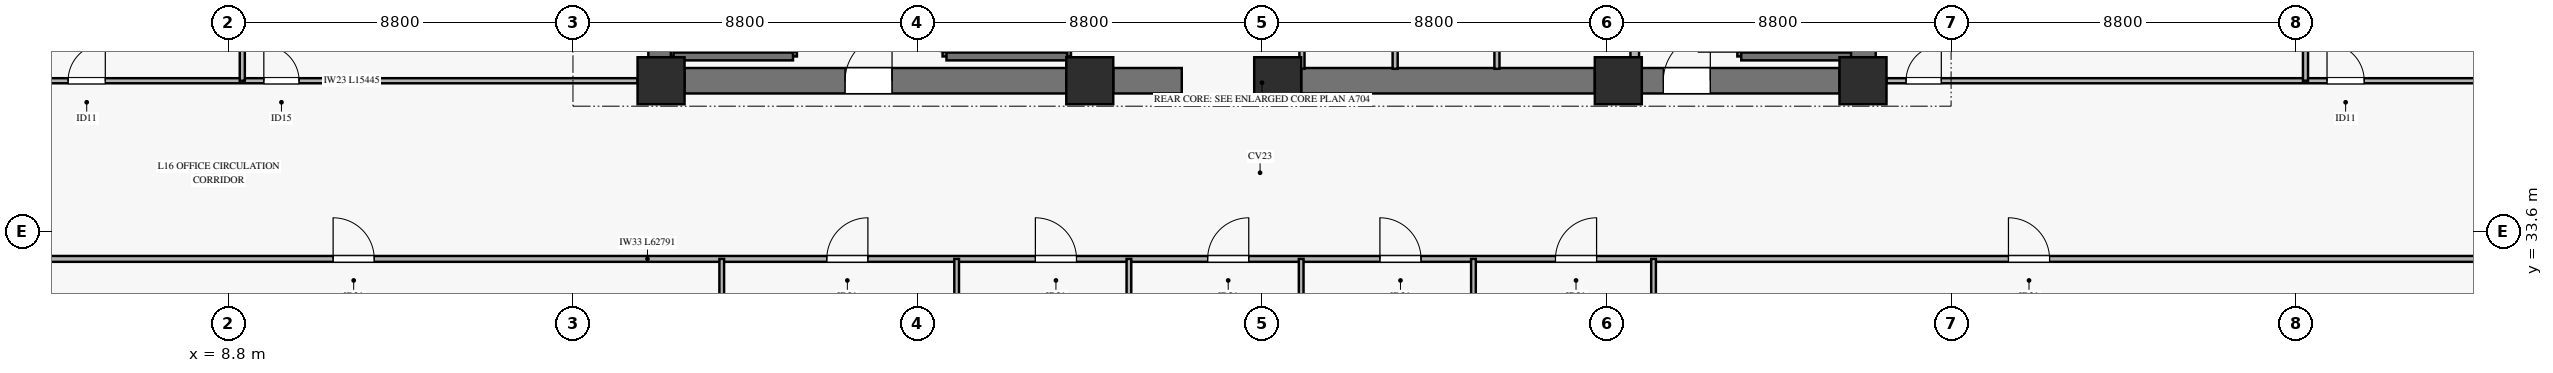
"""IFC4 building model, lengths in metres.
Left out: names, types, materials, properties, quantities, classifications, styles, units other than length and angle.
Written with IfcOpenShell. Run it as: python <this file> out.ifc"""

import sys

from ifc_helpers import new_model, si_unit, direction, frame, frame_2d, origin, origin_2d, place, context, subcontext, project, spatial, rectangle, extrude, source, transform, mapped, element, fill, save


model = new_model("IFC4")
c1 = context("Model", 3, precision=1e-05, world=origin(), true_north=direction((0.0, 1.0)))
c2 = subcontext(c1, "Body", "Model", "MODEL_VIEW")
j1 = project(units=[si_unit("LENGTHUNIT", "METRE"), si_unit("PLANEANGLEUNIT", "RADIAN")], contexts=[c1])
p1 = place(None, origin())
s1 = spatial("IfcSite", under=j1, at=p1, CompositionType="ELEMENT")
p2 = place(p1, origin())
s2 = spatial("IfcBuilding", under=s1, at=p2, CompositionType="ELEMENT")
p3 = place(p2, frame((0.0, 0.0, 65.0)))
s3 = spatial("IfcBuildingStorey", under=s2, at=p3, CompositionType="ELEMENT", Elevation=65.0)
m1 = source(origin(), c2, "Body", "SweptSolid", [
    extrude(rectangle(XDim=1.2, YDim=1.2, at=origin_2d()), origin(), (0.0, 0.0, 1.0), 3.68),
])
for number, where, z_axis, x_axis in (
    (1, (19.85, 37.45, 0.0), (0.0, 0.0, 1.0), (1.0, 0.0, 0.0)),
    (2, (30.8, 37.45, 0.0), (0.0, 0.0, 1.0), (1.0, 0.0, 0.0)),
    (3, (35.6, 37.45, 0.0), (0.0, 0.0, 1.0), (1.0, 0.0, 0.0)),
    (4, (44.3, 37.45, 0.0), (0.0, 0.0, 1.0), (1.0, 0.0, 0.0)),
    (5, (50.55, 37.45, 0.0), (0.0, 0.0, 1.0), (1.0, 0.0, 0.0)),
):
    element("IfcColumn", number, at=place(p3, frame(where, z_axis=z_axis, x_axis=x_axis)), inside=s3, PredefinedType="PILASTER", context=c2, shape_type="MappedRepresentation", body=[
        mapped(m1, transform((0.0, 0.0, 0.0), x_axis=(1.0, 0.0, 0.0), y_axis=(0.0, 1.0, 0.0), z_axis=(0.0, 0.0, 1.0), scale=1.0)),
    ])
p4 = place(p3, frame((20.45, 37.45, 0.0), z_axis=(0.0, 0.0, 1.0), x_axis=(1.0, 0.0, 0.0)))
e6 = element("IfcWall", 6, at=p4, inside=s3, PredefinedType="SHEAR", context=c2, shape_type="SweptSolid", body=[
    extrude(rectangle(XDim=9.75, YDim=0.65, at=frame_2d((4.875, 0.0))), origin(), (0.0, 0.0, 1.0), 3.68),
])
p5 = place(p4, frame((4.1, 0.0, 0.0)))
e7 = element("IfcOpeningElement", 7, at=p5, cuts=e6, PredefinedType="OPENING", context=c2, shape_type="SweptSolid", body=[
    extrude(rectangle(XDim=1.2, YDim=2.15, at=frame_2d((0.6, 1.075))), frame((0.0, 0.335, 0.0), z_axis=(0.0, -1.0, 0.0), x_axis=(1.0, 0.0, 0.0)), (0.0, 0.0, 1.0), 0.67),
])
p6 = place(p3, frame((31.4, 37.45, 0.0), z_axis=(0.0, 0.0, 1.0), x_axis=(1.0, 0.0, 0.0)))
e8 = element("IfcWall", 8, at=p6, inside=s3, PredefinedType="SHEAR", context=c2, shape_type="SweptSolid", body=[
    extrude(rectangle(XDim=1.75, YDim=0.65, at=frame_2d((0.875, 0.0))), origin(), (0.0, 0.0, 1.0), 3.68),
])
p7 = place(p3, frame((36.2, 37.45, 0.0), z_axis=(0.0, 0.0, 1.0), x_axis=(1.0, 0.0, 0.0)))
e9 = element("IfcWall", 9, at=p7, inside=s3, PredefinedType="SHEAR", context=c2, shape_type="SweptSolid", body=[
    extrude(rectangle(XDim=7.5, YDim=0.65, at=frame_2d((3.75, 0.0))), origin(), (0.0, 0.0, 1.0), 3.68),
])
p8 = place(p3, frame((44.9, 37.45, 0.0), z_axis=(0.0, 0.0, 1.0), x_axis=(1.0, 0.0, 0.0)))
e10 = element("IfcWall", 10, at=p8, inside=s3, PredefinedType="SHEAR", context=c2, shape_type="SweptSolid", body=[
    extrude(rectangle(XDim=5.05, YDim=0.65, at=frame_2d((2.525, 0.0))), origin(), (0.0, 0.0, 1.0), 3.68),
])
p9 = place(p8, frame((0.55, 0.0, 0.0)))
e11 = element("IfcOpeningElement", 11, at=p9, cuts=e10, PredefinedType="OPENING", context=c2, shape_type="SweptSolid", body=[
    extrude(rectangle(XDim=1.2, YDim=2.15, at=frame_2d((0.6, 1.075))), frame((0.0, 0.335, 0.0), z_axis=(0.0, -1.0, 0.0), x_axis=(1.0, 0.0, 0.0)), (0.0, 0.0, 1.0), 0.67),
])
for number, where, z_axis, x_axis in (
    (12, (19.85, 38.05, 0.0), (0.0, 0.0, 1.0), (0.0, 1.0, 0.0)),
    (13, (50.55, 38.05, 0.0), (0.0, 0.0, 1.0), (0.0, 1.0, 0.0)),
):
    element("IfcWall", number, at=place(p3, frame(where, z_axis=z_axis, x_axis=x_axis)), inside=s3, PredefinedType="SHEAR", context=c2, shape_type="SweptSolid", body=[
        extrude(rectangle(XDim=7.9, YDim=0.65, at=frame_2d((3.95, 0.0))), origin(), (0.0, 0.0, 1.0), 3.68),
    ])
p10 = place(p3, frame((20.17, 38.07, 0.0), z_axis=(0.0, 0.0, 1.0), x_axis=(0.0, 1.0, 0.0)))
e14 = element("IfcWall", 14, at=p10, inside=s3, PredefinedType="SOLIDWALL", context=c2, shape_type="SweptSolid", body=[
    extrude(rectangle(XDim=7.25, YDim=0.14, at=frame_2d((3.625, 0.0))), origin(), (0.0, 0.0, 1.0), 3.9),
])
p11 = place(p3, frame((23.22, 38.07, 0.0), z_axis=(0.0, 0.0, 1.0), x_axis=(0.0, 1.0, 0.0)))
e15 = element("IfcWall", 15, at=p11, inside=s3, PredefinedType="SOLIDWALL", context=c2, shape_type="SweptSolid", body=[
    extrude(rectangle(XDim=7.25, YDim=0.2, at=frame_2d((3.625, 0.0))), origin(), (0.0, 0.0, 1.0), 3.9),
])
p12 = place(p11, frame((0.11, 0.0, 0.0)))
e16 = element("IfcOpeningElement", 16, at=p12, cuts=e15, PredefinedType="OPENING", context=c2, shape_type="SweptSolid", body=[
    extrude(rectangle(XDim=1.1, YDim=2.15, at=frame_2d((0.55, 1.075))), frame((0.0, 0.11, 0.0), z_axis=(0.0, -1.0, 0.0), x_axis=(1.0, 0.0, 0.0)), (0.0, 0.0, 1.0), 0.22),
])
p13 = place(p3, frame((20.17, 38.07, 0.0), z_axis=(0.0, 0.0, 1.0), x_axis=(1.0, 0.0, 0.0)))
e17 = element("IfcWall", 17, at=p13, inside=s3, PredefinedType="SOLIDWALL", context=c2, shape_type="SweptSolid", body=[
    extrude(rectangle(XDim=3.05, YDim=0.2, at=frame_2d((1.525, 0.0))), origin(), (0.0, 0.0, 1.0), 3.9),
])
p14 = place(p3, frame((27.14, 38.07, 0.0), z_axis=(0.0, 0.0, 1.0), x_axis=(0.0, 1.0, 0.0)))
e18 = element("IfcWall", 18, at=p14, inside=s3, PredefinedType="SOLIDWALL", context=c2, shape_type="SweptSolid", body=[
    extrude(rectangle(XDim=7.25, YDim=0.2, at=frame_2d((3.625, 0.0))), origin(), (0.0, 0.0, 1.0), 3.9),
])
p15 = place(p14, frame((0.11, 0.0, 0.0)))
e19 = element("IfcOpeningElement", 19, at=p15, cuts=e18, PredefinedType="OPENING", context=c2, shape_type="SweptSolid", body=[
    extrude(rectangle(XDim=1.1, YDim=2.15, at=frame_2d((0.55, 1.075))), frame((0.0, 0.11, 0.0), z_axis=(0.0, -1.0, 0.0), x_axis=(1.0, 0.0, 0.0)), (0.0, 0.0, 1.0), 0.22),
])
p16 = place(p3, frame((30.22, 38.07, 0.0), z_axis=(0.0, 0.0, 1.0), x_axis=(0.0, 1.0, 0.0)))
e20 = element("IfcWall", 20, at=p16, inside=s3, PredefinedType="SOLIDWALL", context=c2, shape_type="SweptSolid", body=[
    extrude(rectangle(XDim=7.25, YDim=0.2, at=frame_2d((3.625, 0.0))), origin(), (0.0, 0.0, 1.0), 3.9),
])
p17 = place(p3, frame((27.14, 38.07, 0.0), z_axis=(0.0, 0.0, 1.0), x_axis=(1.0, 0.0, 0.0)))
e21 = element("IfcWall", 21, at=p17, inside=s3, PredefinedType="SOLIDWALL", context=c2, shape_type="SweptSolid", body=[
    extrude(rectangle(XDim=3.08, YDim=0.2, at=frame_2d((1.54, 0.0))), origin(), (0.0, 0.0, 1.0), 3.9),
])
p18 = place(p3, frame((47.44, 38.07, 0.0), z_axis=(0.0, 0.0, 1.0), x_axis=(0.0, 1.0, 0.0)))
e22 = element("IfcWall", 22, at=p18, inside=s3, PredefinedType="SOLIDWALL", context=c2, shape_type="SweptSolid", body=[
    extrude(rectangle(XDim=7.25, YDim=0.2, at=frame_2d((3.625, 0.0))), origin(), (0.0, 0.0, 1.0), 3.9),
])
p19 = place(p18, frame((0.11, 0.0, 0.0)))
e23 = element("IfcOpeningElement", 23, at=p19, cuts=e22, PredefinedType="OPENING", context=c2, shape_type="SweptSolid", body=[
    extrude(rectangle(XDim=1.1, YDim=2.15, at=frame_2d((0.55, 1.075))), frame((0.0, 0.11, 0.0), z_axis=(0.0, -1.0, 0.0), x_axis=(1.0, 0.0, 0.0)), (0.0, 0.0, 1.0), 0.22),
])
p20 = place(p3, frame((47.44, 38.07, 0.0), z_axis=(0.0, 0.0, 1.0), x_axis=(1.0, 0.0, 0.0)))
e24 = element("IfcWall", 24, at=p20, inside=s3, PredefinedType="SOLIDWALL", context=c2, shape_type="SweptSolid", body=[
    extrude(rectangle(XDim=2.805, YDim=0.2, at=frame_2d((1.403, 0.0))), origin(), (0.0, 0.0, 1.0), 3.9),
])
p21 = place(p3, frame((44.72, 37.755, 0.0), z_axis=(0.0, 0.0, 1.0), x_axis=(0.0, 1.0, 0.0)))
e25 = element("IfcWall", 25, at=p21, inside=s3, PredefinedType="SOLIDWALL", context=c2, shape_type="SweptSolid", body=[
    extrude(rectangle(XDim=7.465, YDim=0.22, at=frame_2d((3.732, 0.0))), origin(), (0.0, 0.0, 1.0), 3.68),
])
p22 = place(p3, frame((36.22, 37.755, 0.0), z_axis=(0.0, 0.0, 1.0), x_axis=(0.0, 1.0, 0.0)))
e26 = element("IfcWall", 26, at=p22, inside=s3, PredefinedType="PARTITIONING", context=c2, shape_type="SweptSolid", body=[
    extrude(rectangle(XDim=2.165, YDim=0.13, at=frame_2d((1.083, 0.0))), origin(), (0.0, 0.0, 1.0), 3.68),
])
p23 = place(p22, frame((0.855, 0.0, 0.0)))
e27 = element("IfcOpeningElement", 27, at=p23, cuts=e26, PredefinedType="OPENING", context=c2, shape_type="SweptSolid", body=[
    extrude(rectangle(XDim=0.9, YDim=2.1, at=frame_2d((0.45, 1.05))), frame((0.0, 0.075, 0.0), z_axis=(0.0, -1.0, 0.0), x_axis=(1.0, 0.0, 0.0)), (0.0, 0.0, 1.0), 0.15),
])
p24 = place(p3, frame((38.6, 37.755, 0.0), z_axis=(0.0, 0.0, 1.0), x_axis=(0.0, 1.0, 0.0)))
e28 = element("IfcWall", 28, at=p24, inside=s3, PredefinedType="PARTITIONING", context=c2, shape_type="SweptSolid", body=[
    extrude(rectangle(XDim=2.165, YDim=0.13, at=frame_2d((1.083, 0.0))), origin(), (0.0, 0.0, 1.0), 3.68),
])
p25 = place(p24, frame((0.565, 0.0, 0.0)))
e29 = element("IfcOpeningElement", 29, at=p25, cuts=e28, PredefinedType="OPENING", context=c2, shape_type="SweptSolid", body=[
    extrude(rectangle(XDim=0.9, YDim=2.1, at=frame_2d((0.45, 1.05))), frame((0.0, 0.075, 0.0), z_axis=(0.0, -1.0, 0.0), x_axis=(1.0, 0.0, 0.0)), (0.0, 0.0, 1.0), 0.15),
])
p26 = place(p3, frame((41.2, 37.755, 0.0), z_axis=(0.0, 0.0, 1.0), x_axis=(0.0, 1.0, 0.0)))
e30 = element("IfcWall", 30, at=p26, inside=s3, PredefinedType="PARTITIONING", context=c2, shape_type="SweptSolid", body=[
    extrude(rectangle(XDim=2.165, YDim=0.13, at=frame_2d((1.083, 0.0))), origin(), (0.0, 0.0, 1.0), 3.68),
])
p27 = place(p26, frame((0.565, 0.0, 0.0)))
e31 = element("IfcOpeningElement", 31, at=p27, cuts=e30, PredefinedType="OPENING", context=c2, shape_type="SweptSolid", body=[
    extrude(rectangle(XDim=0.9, YDim=2.1, at=frame_2d((0.45, 1.05))), frame((0.0, 0.075, 0.0), z_axis=(0.0, -1.0, 0.0), x_axis=(1.0, 0.0, 0.0)), (0.0, 0.0, 1.0), 0.15),
])
p28 = place(p3, frame((3.805, 32.9, 0.0), z_axis=(0.0, 0.0, 1.0), x_axis=(1.0, 0.0, 0.0)))
e32 = element("IfcWall", 32, at=p28, inside=s3, PredefinedType="PARTITIONING", context=c2, shape_type="SweptSolid", body=[
    extrude(rectangle(XDim=62.791, YDim=0.15, at=frame_2d((31.396, 0.0))), origin(), (0.0, 0.0, 1.0), 2.765),
])
p29 = place(p28, frame((7.669, 0.0, 0.0)))
e33 = element("IfcOpeningElement", 33, at=p29, cuts=e32, PredefinedType="OPENING", context=c2, shape_type="SweptSolid", body=[
    extrude(rectangle(XDim=1.05, YDim=2.15, at=frame_2d((0.525, 1.075))), frame((0.0, 0.085, 0.0), z_axis=(0.0, -1.0, 0.0), x_axis=(1.0, 0.0, 0.0)), (0.0, 0.0, 1.0), 0.17),
])
p30 = place(p28, frame((20.278, 0.0, 0.0)))
e34 = element("IfcOpeningElement", 34, at=p30, cuts=e32, PredefinedType="OPENING", context=c2, shape_type="SweptSolid", body=[
    extrude(rectangle(XDim=1.05, YDim=2.15, at=frame_2d((0.525, 1.075))), frame((0.0, 0.085, 0.0), z_axis=(0.0, -1.0, 0.0), x_axis=(1.0, 0.0, 0.0)), (0.0, 0.0, 1.0), 0.17),
])
p31 = place(p28, frame((25.606, 0.0, 0.0)))
e35 = element("IfcOpeningElement", 35, at=p31, cuts=e32, PredefinedType="OPENING", context=c2, shape_type="SweptSolid", body=[
    extrude(rectangle(XDim=1.05, YDim=2.15, at=frame_2d((0.525, 1.075))), frame((0.0, 0.085, 0.0), z_axis=(0.0, -1.0, 0.0), x_axis=(1.0, 0.0, 0.0)), (0.0, 0.0, 1.0), 0.17),
])
p32 = place(p28, frame((30.006, 0.0, 0.0)))
e36 = element("IfcOpeningElement", 36, at=p32, cuts=e32, PredefinedType="OPENING", context=c2, shape_type="SweptSolid", body=[
    extrude(rectangle(XDim=1.05, YDim=2.15, at=frame_2d((0.525, 1.075))), frame((0.0, 0.085, 0.0), z_axis=(0.0, -1.0, 0.0), x_axis=(1.0, 0.0, 0.0)), (0.0, 0.0, 1.0), 0.17),
])
p33 = place(p28, frame((34.406, 0.0, 0.0)))
e37 = element("IfcOpeningElement", 37, at=p33, cuts=e32, PredefinedType="OPENING", context=c2, shape_type="SweptSolid", body=[
    extrude(rectangle(XDim=1.05, YDim=2.15, at=frame_2d((0.525, 1.075))), frame((0.0, 0.085, 0.0), z_axis=(0.0, -1.0, 0.0), x_axis=(1.0, 0.0, 0.0)), (0.0, 0.0, 1.0), 0.17),
])
p34 = place(p28, frame((38.89, 0.0, 0.0)))
e38 = element("IfcOpeningElement", 38, at=p34, cuts=e32, PredefinedType="OPENING", context=c2, shape_type="SweptSolid", body=[
    extrude(rectangle(XDim=1.05, YDim=2.15, at=frame_2d((0.525, 1.075))), frame((0.0, 0.085, 0.0), z_axis=(0.0, -1.0, 0.0), x_axis=(1.0, 0.0, 0.0)), (0.0, 0.0, 1.0), 0.17),
])
p35 = place(p28, frame((50.46, 0.0, 0.0)))
e39 = element("IfcOpeningElement", 39, at=p35, cuts=e32, PredefinedType="OPENING", context=c2, shape_type="SweptSolid", body=[
    extrude(rectangle(XDim=1.05, YDim=2.15, at=frame_2d((0.525, 1.075))), frame((0.0, 0.085, 0.0), z_axis=(0.0, -1.0, 0.0), x_axis=(1.0, 0.0, 0.0)), (0.0, 0.0, 1.0), 0.17),
])
for number, where, z_axis, x_axis in (
    (40, (21.4, 4.882, 0.0), (0.0, 0.0, 1.0), (0.0, 1.0, 0.0)),
    (41, (27.4, 4.882, 0.0), (0.0, 0.0, 1.0), (0.0, 1.0, 0.0)),
    (42, (31.8, 4.882, 0.0), (0.0, 0.0, 1.0), (0.0, 1.0, 0.0)),
    (43, (36.2, 4.882, 0.0), (0.0, 0.0, 1.0), (0.0, 1.0, 0.0)),
    (44, (40.6, 4.882, 0.0), (0.0, 0.0, 1.0), (0.0, 1.0, 0.0)),
    (45, (45.2, 4.882, 0.0), (0.0, 0.0, 1.0), (0.0, 1.0, 0.0)),
):
    element("IfcWall", number, at=place(p3, frame(where, z_axis=z_axis, x_axis=x_axis)), inside=s3, PredefinedType="PARTITIONING", context=c2, shape_type="SweptSolid", body=[
        extrude(rectangle(XDim=28.018, YDim=0.12, at=frame_2d((14.009, 0.0))), origin(), (0.0, 0.0, 1.0), 3.165),
    ])
p36 = place(p3, frame((3.805, 37.45, 0.0), z_axis=(0.0, 0.0, 1.0), x_axis=(1.0, 0.0, 0.0)))
e46 = element("IfcWall", 46, at=p36, inside=s3, PredefinedType="PARTITIONING", context=c2, shape_type="SweptSolid", body=[
    extrude(rectangle(XDim=15.445, YDim=0.13, at=frame_2d((7.723, 0.0))), origin(), (0.0, 0.0, 1.0), 3.165),
])
p37 = place(p36, frame((0.9, 0.0, 0.0)))
e47 = element("IfcOpeningElement", 47, at=p37, cuts=e46, PredefinedType="OPENING", context=c2, shape_type="SweptSolid", body=[
    extrude(rectangle(XDim=0.95, YDim=2.1, at=frame_2d((0.475, 1.05))), frame((0.0, 0.075, 0.0), z_axis=(0.0, -1.0, 0.0), x_axis=(1.0, 0.0, 0.0)), (0.0, 0.0, 1.0), 0.15),
])
p38 = place(p36, frame((5.899, 0.0, 0.0)))
e48 = element("IfcOpeningElement", 48, at=p38, cuts=e46, PredefinedType="OPENING", context=c2, shape_type="SweptSolid", body=[
    extrude(rectangle(XDim=0.9, YDim=2.1, at=frame_2d((0.45, 1.05))), frame((0.0, 0.075, 0.0), z_axis=(0.0, -1.0, 0.0), x_axis=(1.0, 0.0, 0.0)), (0.0, 0.0, 1.0), 0.15),
])
p39 = place(p3, frame((9.154, 37.45, 0.0), z_axis=(0.0, 0.0, 1.0), x_axis=(0.0, 1.0, 0.0)))
e49 = element("IfcWall", 49, at=p39, inside=s3, PredefinedType="PARTITIONING", context=c2, shape_type="SweptSolid", body=[
    extrude(rectangle(XDim=8.8, YDim=0.13, at=frame_2d((4.4, 0.0))), origin(), (0.0, 0.0, 1.0), 3.68),
])
p40 = place(p3, frame((51.15, 37.45, 0.0), z_axis=(0.0, 0.0, 1.0), x_axis=(1.0, 0.0, 0.0)))
e50 = element("IfcWall", 50, at=p40, inside=s3, PredefinedType="PARTITIONING", context=c2, shape_type="SweptSolid", body=[
    extrude(rectangle(XDim=15.446, YDim=0.13, at=frame_2d((7.723, 0.0))), origin(), (0.0, 0.0, 1.0), 3.165),
])
p41 = place(p40, frame((0.5, 0.0, 0.0)))
e51 = element("IfcOpeningElement", 51, at=p41, cuts=e50, PredefinedType="OPENING", context=c2, shape_type="SweptSolid", body=[
    extrude(rectangle(XDim=0.9, YDim=2.1, at=frame_2d((0.45, 1.05))), frame((0.0, 0.075, 0.0), z_axis=(0.0, -1.0, 0.0), x_axis=(1.0, 0.0, 0.0)), (0.0, 0.0, 1.0), 0.15),
])
p42 = place(p40, frame((11.252, 0.0, 0.0)))
e52 = element("IfcOpeningElement", 52, at=p42, cuts=e50, PredefinedType="OPENING", context=c2, shape_type="SweptSolid", body=[
    extrude(rectangle(XDim=0.95, YDim=2.1, at=frame_2d((0.475, 1.05))), frame((0.0, 0.075, 0.0), z_axis=(0.0, -1.0, 0.0), x_axis=(1.0, 0.0, 0.0)), (0.0, 0.0, 1.0), 0.15),
])
p43 = place(p3, frame((61.852, 37.45, 0.0), z_axis=(0.0, 0.0, 1.0), x_axis=(0.0, 1.0, 0.0)))
e53 = element("IfcWall", 53, at=p43, inside=s3, PredefinedType="PARTITIONING", context=c2, shape_type="SweptSolid", body=[
    extrude(rectangle(XDim=8.8, YDim=0.13, at=frame_2d((4.4, 0.0))), origin(), (0.0, 0.0, 1.0), 3.68),
])
m2 = source(origin(), c2, "Body", "SweptSolid", [
    extrude(rectangle(XDim=1.2, YDim=2.15, at=frame_2d((0.6, 1.075))), frame((0.0, 0.025, 0.0), z_axis=(0.0, -1.0, 0.0), x_axis=(1.0, 0.0, 0.0)), (0.0, 0.0, 1.0), 0.05),
])
p44 = place(p5, origin())
e54 = element("IfcDoor", 54, at=p44, inside=s3, OperationType="SINGLE_SWING_RIGHT", PredefinedType="DOOR", context=c2, shape_type="MappedRepresentation", body=[
    mapped(m2, transform((0.0, 0.0, 0.0), x_axis=(1.0, 0.0, 0.0), y_axis=(0.0, 1.0, 0.0), z_axis=(0.0, 0.0, 1.0), scale=1.0)),
])
fill(e7, e54)
p45 = place(p9, origin())
e55 = element("IfcDoor", 55, at=p45, inside=s3, OperationType="SINGLE_SWING_RIGHT", PredefinedType="DOOR", context=c2, shape_type="MappedRepresentation", body=[
    mapped(m2, transform((0.0, 0.0, 0.0), x_axis=(1.0, 0.0, 0.0), y_axis=(0.0, 1.0, 0.0), z_axis=(0.0, 0.0, 1.0), scale=1.0)),
])
fill(e11, e55)
m3 = source(origin(), c2, "Body", "SweptSolid", [
    extrude(rectangle(XDim=1.05, YDim=2.15, at=frame_2d((0.525, 1.075))), frame((0.0, 0.025, 0.0), z_axis=(0.0, -1.0, 0.0), x_axis=(1.0, 0.0, 0.0)), (0.0, 0.0, 1.0), 0.05),
])
p46 = place(p29, origin())
e56 = element("IfcDoor", 56, at=p46, inside=s3, OperationType="SINGLE_SWING_LEFT", PredefinedType="DOOR", context=c2, shape_type="MappedRepresentation", body=[
    mapped(m3, transform((0.0, 0.0, 0.0), x_axis=(1.0, 0.0, 0.0), y_axis=(0.0, 1.0, 0.0), z_axis=(0.0, 0.0, 1.0), scale=1.0)),
])
fill(e33, e56)
p47 = place(p30, origin())
e57 = element("IfcDoor", 57, at=p47, inside=s3, OperationType="SINGLE_SWING_RIGHT", PredefinedType="DOOR", context=c2, shape_type="MappedRepresentation", body=[
    mapped(m3, transform((0.0, 0.0, 0.0), x_axis=(1.0, 0.0, 0.0), y_axis=(0.0, 1.0, 0.0), z_axis=(0.0, 0.0, 1.0), scale=1.0)),
])
fill(e34, e57)
p48 = place(p31, origin())
e58 = element("IfcDoor", 58, at=p48, inside=s3, OperationType="SINGLE_SWING_LEFT", PredefinedType="DOOR", context=c2, shape_type="MappedRepresentation", body=[
    mapped(m3, transform((0.0, 0.0, 0.0), x_axis=(1.0, 0.0, 0.0), y_axis=(0.0, 1.0, 0.0), z_axis=(0.0, 0.0, 1.0), scale=1.0)),
])
fill(e35, e58)
p49 = place(p32, origin())
e59 = element("IfcDoor", 59, at=p49, inside=s3, OperationType="SINGLE_SWING_RIGHT", PredefinedType="DOOR", context=c2, shape_type="MappedRepresentation", body=[
    mapped(m3, transform((0.0, 0.0, 0.0), x_axis=(1.0, 0.0, 0.0), y_axis=(0.0, 1.0, 0.0), z_axis=(0.0, 0.0, 1.0), scale=1.0)),
])
fill(e36, e59)
p50 = place(p33, origin())
e60 = element("IfcDoor", 60, at=p50, inside=s3, OperationType="SINGLE_SWING_LEFT", PredefinedType="DOOR", context=c2, shape_type="MappedRepresentation", body=[
    mapped(m3, transform((0.0, 0.0, 0.0), x_axis=(1.0, 0.0, 0.0), y_axis=(0.0, 1.0, 0.0), z_axis=(0.0, 0.0, 1.0), scale=1.0)),
])
fill(e37, e60)
p51 = place(p34, origin())
e61 = element("IfcDoor", 61, at=p51, inside=s3, OperationType="SINGLE_SWING_RIGHT", PredefinedType="DOOR", context=c2, shape_type="MappedRepresentation", body=[
    mapped(m3, transform((0.0, 0.0, 0.0), x_axis=(1.0, 0.0, 0.0), y_axis=(0.0, 1.0, 0.0), z_axis=(0.0, 0.0, 1.0), scale=1.0)),
])
fill(e38, e61)
p52 = place(p35, origin())
e62 = element("IfcDoor", 62, at=p52, inside=s3, OperationType="SINGLE_SWING_LEFT", PredefinedType="DOOR", context=c2, shape_type="MappedRepresentation", body=[
    mapped(m3, transform((0.0, 0.0, 0.0), x_axis=(1.0, 0.0, 0.0), y_axis=(0.0, 1.0, 0.0), z_axis=(0.0, 0.0, 1.0), scale=1.0)),
])
fill(e39, e62)
m4 = source(origin(), c2, "Body", "SweptSolid", [
    extrude(rectangle(XDim=0.95, YDim=2.1, at=frame_2d((0.475, 1.05))), frame((0.0, 0.025, 0.0), z_axis=(0.0, -1.0, 0.0), x_axis=(1.0, 0.0, 0.0)), (0.0, 0.0, 1.0), 0.05),
])
p53 = place(p37, origin())
e63 = element("IfcDoor", 63, at=p53, inside=s3, OperationType="SINGLE_SWING_RIGHT", PredefinedType="DOOR", context=c2, shape_type="MappedRepresentation", body=[
    mapped(m4, transform((0.0, 0.0, 0.0), x_axis=(1.0, 0.0, 0.0), y_axis=(0.0, 1.0, 0.0), z_axis=(0.0, 0.0, 1.0), scale=1.0)),
])
fill(e47, e63)
m5 = source(origin(), c2, "Body", "SweptSolid", [
    extrude(rectangle(XDim=0.9, YDim=2.1, at=frame_2d((0.45, 1.05))), frame((0.0, 0.025, 0.0), z_axis=(0.0, -1.0, 0.0), x_axis=(1.0, 0.0, 0.0)), (0.0, 0.0, 1.0), 0.05),
])
p54 = place(p38, origin())
e64 = element("IfcDoor", 64, at=p54, inside=s3, OperationType="SINGLE_SWING_LEFT", PredefinedType="DOOR", context=c2, shape_type="MappedRepresentation", body=[
    mapped(m5, transform((0.0, 0.0, 0.0), x_axis=(1.0, 0.0, 0.0), y_axis=(0.0, 1.0, 0.0), z_axis=(0.0, 0.0, 1.0), scale=1.0)),
])
fill(e48, e64)
p55 = place(p41, origin())
e65 = element("IfcDoor", 65, at=p55, inside=s3, OperationType="SINGLE_SWING_RIGHT", PredefinedType="DOOR", context=c2, shape_type="MappedRepresentation", body=[
    mapped(m5, transform((0.0, 0.0, 0.0), x_axis=(1.0, 0.0, 0.0), y_axis=(0.0, 1.0, 0.0), z_axis=(0.0, 0.0, 1.0), scale=1.0)),
])
fill(e51, e65)
p56 = place(p42, origin())
e66 = element("IfcDoor", 66, at=p56, inside=s3, OperationType="SINGLE_SWING_LEFT", PredefinedType="DOOR", context=c2, shape_type="MappedRepresentation", body=[
    mapped(m4, transform((0.0, 0.0, 0.0), x_axis=(1.0, 0.0, 0.0), y_axis=(0.0, 1.0, 0.0), z_axis=(0.0, 0.0, 1.0), scale=1.0)),
])
fill(e52, e66)
save(model, sys.argv[1])
